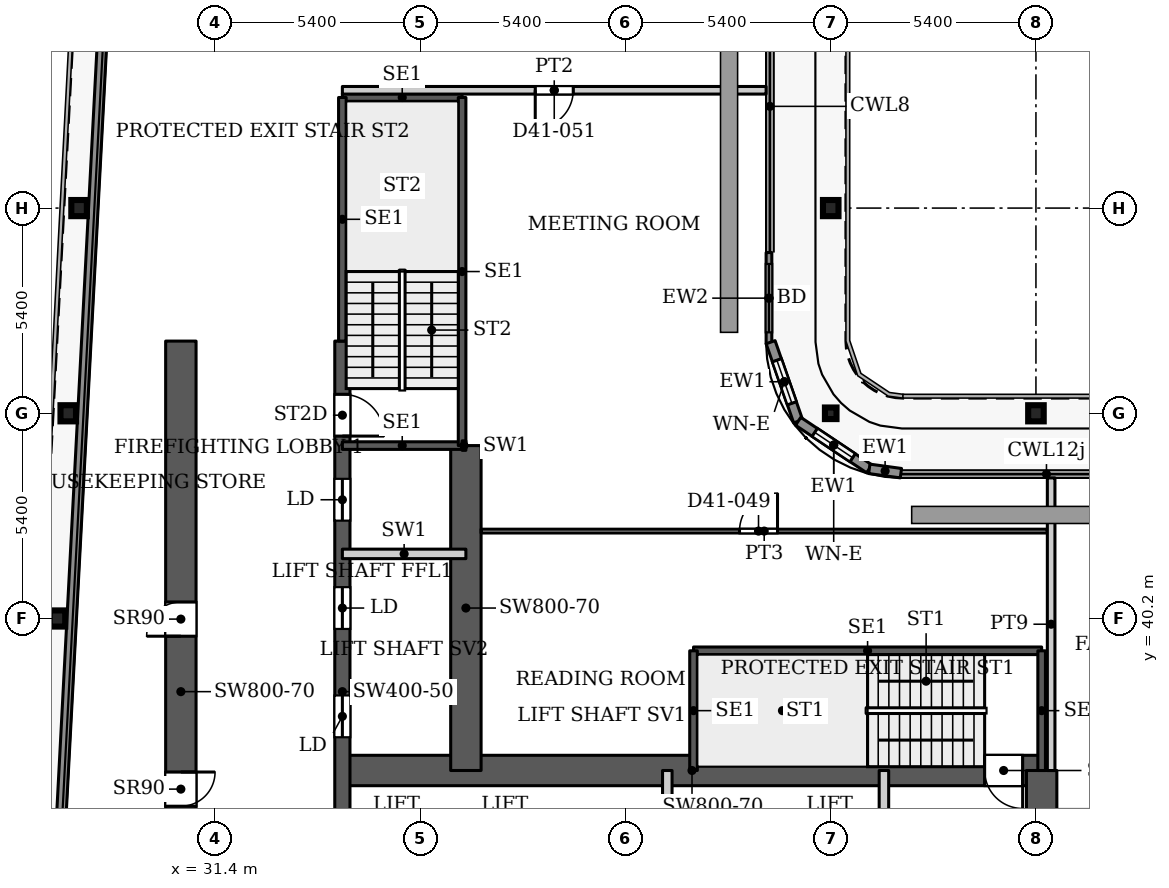
"""IFC4 building model, lengths in metres.
Left out: names, types, materials, properties, quantities, classifications, styles, units other than length and angle.
Written with IfcOpenShell. Run it as: python <this file> out.ifc"""

import sys

from ifc_helpers import new_model, si_unit, direction, frame, frame_2d, origin, origin_2d, place, context, subcontext, project, spatial, rectangle, hollow_rectangle, i_section, extrude, source, transform, mapped, element, fill, save


model = new_model("IFC4")
c1 = context("Model", 3, precision=1e-05, world=origin(), true_north=direction((0.0, 1.0)))
c2 = subcontext(c1, "Body", "Model", "MODEL_VIEW")
j1 = project(units=[si_unit("LENGTHUNIT", "METRE"), si_unit("PLANEANGLEUNIT", "RADIAN")], contexts=[c1])
p1 = place(None, origin())
s1 = spatial("IfcSite", under=j1, at=p1, CompositionType="ELEMENT")
p2 = place(p1, origin())
s2 = spatial("IfcBuilding", under=s1, at=p2, CompositionType="ELEMENT")
p3 = place(p2, frame((0.0, 0.0, 179.9)))
s3 = spatial("IfcBuildingStorey", under=s2, at=p3, CompositionType="ELEMENT", Elevation=179.9)
for number, where, z_axis, x_axis in (
    (1, (27.253, 40.2, 0.0), (0.0, 0.0, 1.0), (1.0, 0.0, 0.0)),
    (2, (27.537, 45.6, 0.0), (0.0, 0.0, 1.0), (1.0, 0.0, 0.0)),
    (3, (53.0, 45.6, 0.0), (0.0, 0.0, 1.0), (1.0, 0.0, 0.0)),
    (4, (27.822, 51.0, 0.0), (0.0, 0.0, 1.0), (1.0, 0.0, 0.0)),
    (5, (47.6, 51.0, 0.0), (0.0, 0.0, 1.0), (1.0, 0.0, 0.0)),
):
    element("IfcColumn", number, at=place(p3, frame(where, z_axis=z_axis, x_axis=x_axis)), inside=s3, PredefinedType="COLUMN", context=c2, shape_type="SweptSolid", body=[
        extrude(i_section(OverallWidth=0.409, OverallDepth=0.425, WebThickness=0.033, FlangeThickness=0.052, FilletRadius=0.013, at=origin_2d()), origin(), (0.0, 0.0, 1.0), 3.9),
    ])
p4 = place(p3, frame((47.6, 45.6, 0.0), z_axis=(0.0, 0.0, 1.0), x_axis=(1.0, 0.0, 0.0)))
e6 = element("IfcColumn", 6, at=p4, inside=s3, PredefinedType="COLUMN", context=c2, shape_type="SweptSolid", body=[
    extrude(hollow_rectangle(XDim=0.305, YDim=0.305, WallThickness=0.016, InnerFilletRadius=0.016, OuterFilletRadius=0.032, at=origin_2d()), origin(), (0.0, 0.0, 1.0), 3.9),
])
p5 = place(p3, frame((34.75, 36.2, 0.0), z_axis=(0.0, 0.0, 1.0), x_axis=(1.0, 0.0, 0.0)))
e7 = element("IfcWall", 7, at=p5, inside=s3, PredefinedType="SHEAR", context=c2, shape_type="SweptSolid", body=[
    extrude(rectangle(XDim=18.4, YDim=0.8, at=frame_2d((9.2, 0.0))), origin(), (0.0, 0.0, 1.0), 3.9),
])
p6 = place(p5, frame((16.9, 0.0, 0.0)))
e8 = element("IfcOpeningElement", 8, at=p6, cuts=e7, PredefinedType="OPENING", context=c2, shape_type="SweptSolid", body=[
    extrude(rectangle(XDim=1.0, YDim=2.2, at=frame_2d((0.5, 1.1))), frame((0.0, 0.41, 0.0), z_axis=(0.0, -1.0, 0.0), x_axis=(1.0, 0.0, 0.0)), (0.0, 0.0, 1.0), 0.82),
])
p7 = place(p3, frame((34.75, 29.05, 0.0), z_axis=(0.0, 0.0, 1.0), x_axis=(0.0, 1.0, 0.0)))
e9 = element("IfcWall", 9, at=p7, inside=s3, PredefinedType="SHEAR", context=c2, shape_type="SweptSolid", body=[
    extrude(rectangle(XDim=18.45, YDim=0.4, at=frame_2d((9.225, 0.0))), origin(), (0.0, 0.0, 1.0), 3.9),
])
p8 = place(p7, frame((8.025, 0.0, 0.0)))
e10 = element("IfcOpeningElement", 10, at=p8, cuts=e9, PredefinedType="OPENING", context=c2, shape_type="SweptSolid", body=[
    extrude(rectangle(XDim=1.1, YDim=2.2, at=frame_2d((0.55, 1.1))), frame((0.0, 0.21, 0.0), z_axis=(0.0, -1.0, 0.0), x_axis=(1.0, 0.0, 0.0)), (0.0, 0.0, 1.0), 0.42),
])
p9 = place(p7, frame((10.875, 0.0, 0.0)))
e11 = element("IfcOpeningElement", 11, at=p9, cuts=e9, PredefinedType="OPENING", context=c2, shape_type="SweptSolid", body=[
    extrude(rectangle(XDim=1.1, YDim=2.2, at=frame_2d((0.55, 1.1))), frame((0.0, 0.21, 0.0), z_axis=(0.0, -1.0, 0.0), x_axis=(1.0, 0.0, 0.0)), (0.0, 0.0, 1.0), 0.42),
])
p10 = place(p7, frame((13.725, 0.0, 0.0)))
e12 = element("IfcOpeningElement", 12, at=p10, cuts=e9, PredefinedType="OPENING", context=c2, shape_type="SweptSolid", body=[
    extrude(rectangle(XDim=1.1, YDim=2.2, at=frame_2d((0.55, 1.1))), frame((0.0, 0.21, 0.0), z_axis=(0.0, -1.0, 0.0), x_axis=(1.0, 0.0, 0.0)), (0.0, 0.0, 1.0), 0.42),
])
p11 = place(p7, frame((15.95, 0.0, 0.0)))
e13 = element("IfcOpeningElement", 13, at=p11, cuts=e9, PredefinedType="OPENING", context=c2, shape_type="SweptSolid", body=[
    extrude(rectangle(XDim=1.1, YDim=2.2, at=frame_2d((0.55, 1.1))), frame((0.0, 0.21, 0.0), z_axis=(0.0, -1.0, 0.0), x_axis=(1.0, 0.0, 0.0)), (0.0, 0.0, 1.0), 0.42),
])
p12 = place(p3, frame((38.0, 36.2, 0.0), z_axis=(0.0, 0.0, 1.0), x_axis=(0.0, 1.0, 0.0)))
e14 = element("IfcWall", 14, at=p12, inside=s3, PredefinedType="SHEAR", context=c2, shape_type="SweptSolid", body=[
    extrude(rectangle(XDim=8.55, YDim=0.8, at=frame_2d((4.275, 0.0))), origin(), (0.0, 0.0, 1.0), 3.9),
])
p13 = place(p3, frame((30.5, 29.05, 0.0), z_axis=(0.0, 0.0, 1.0), x_axis=(0.0, 1.0, 0.0)))
e15 = element("IfcWall", 15, at=p13, inside=s3, PredefinedType="SHEAR", context=c2, shape_type="SweptSolid", body=[
    extrude(rectangle(XDim=18.45, YDim=0.8, at=frame_2d((9.225, 0.0))), origin(), (0.0, 0.0, 1.0), 3.9),
])
p14 = place(p13, frame((6.21, 0.0, 0.0)))
e16 = element("IfcOpeningElement", 16, at=p14, cuts=e15, PredefinedType="OPENING", context=c2, shape_type="SweptSolid", body=[
    extrude(rectangle(XDim=0.9, YDim=2.2, at=frame_2d((0.45, 1.1))), frame((0.0, 0.41, 0.0), z_axis=(0.0, -1.0, 0.0), x_axis=(1.0, 0.0, 0.0)), (0.0, 0.0, 1.0), 0.82),
])
p15 = place(p13, frame((10.684, 0.0, 0.0)))
e17 = element("IfcOpeningElement", 17, at=p15, cuts=e15, PredefinedType="OPENING", context=c2, shape_type="SweptSolid", body=[
    extrude(rectangle(XDim=0.9, YDim=2.2, at=frame_2d((0.45, 1.1))), frame((0.0, 0.41, 0.0), z_axis=(0.0, -1.0, 0.0), x_axis=(1.0, 0.0, 0.0)), (0.0, 0.0, 1.0), 0.82),
])
p16 = place(p3, frame((53.15, 25.8, 0.0), z_axis=(0.0, 0.0, 1.0), x_axis=(0.0, 1.0, 0.0)))
e18 = element("IfcWall", 18, at=p16, inside=s3, PredefinedType="SHEAR", context=c2, shape_type="SweptSolid", body=[
    extrude(rectangle(XDim=10.4, YDim=0.8, at=frame_2d((5.2, 0.0))), origin(), (0.0, 0.0, 1.0), 3.9),
])
p17 = place(p3, frame((27.195, 31.969, 0.0), z_axis=(0.0, 0.0, 1.0), x_axis=(0.052554995867, 0.998618031286, 0.0)))
e19 = element("IfcWall", 19, at=p17, inside=s3, PredefinedType="SOLIDWALL", context=c2, shape_type="SweptSolid", body=[
    extrude(rectangle(XDim=66.787, YDim=0.25, at=frame_2d((33.394, 0.0))), origin(), (0.0, 0.0, 1.0), 3.75),
])
p18 = place(p3, frame((45.975, 49.83, 0.0), z_axis=(0.0, 0.0, 1.0), x_axis=(0.0, -1.0, 0.0)))
e20 = element("IfcWall", 20, at=p18, inside=s3, PredefinedType="SOLIDWALL", context=c2, shape_type="SweptSolid", body=[
    extrude(rectangle(XDim=2.4, YDim=0.15, at=frame_2d((1.2, 0.0))), origin(), (0.0, 0.0, 1.0), 3.75),
])
p19 = place(p18, frame((0.3, 0.0, 0.0)))
e21 = element("IfcOpeningElement", 21, at=p19, cuts=e20, PredefinedType="OPENING", context=c2, shape_type="SweptSolid", body=[
    extrude(rectangle(XDim=1.8, YDim=2.4, at=frame_2d((0.9, 1.2))), frame((0.0, 0.085, 0.0), z_axis=(0.0, -1.0, 0.0), x_axis=(1.0, 0.0, 0.0)), (0.0, 0.0, 1.0), 0.17),
])
p20 = place(p3, frame((46.018, 47.471, 0.0), z_axis=(0.0, 0.0, 1.0), x_axis=(0.328791208903, -0.944402637093, 0.0)))
e22 = element("IfcWall", 22, at=p20, inside=s3, PredefinedType="SOLIDWALL", context=c2, shape_type="SweptSolid", body=[
    extrude(rectangle(XDim=2.205, YDim=0.25, at=frame_2d((1.102, 0.0))), origin(), (0.0, 0.0, 1.0), 3.75),
])
p21 = place(p20, frame((0.503, 0.0, 0.6)))
e23 = element("IfcOpeningElement", 23, at=p21, cuts=e22, PredefinedType="OPENING", context=c2, shape_type="SweptSolid", body=[
    extrude(rectangle(XDim=1.2, YDim=2.1, at=frame_2d((0.6, 1.05))), frame((0.0, 0.135, 0.0), z_axis=(0.0, -1.0, 0.0), x_axis=(1.0, 0.0, 0.0)), (0.0, 0.0, 1.0), 0.27),
])
p22 = place(p3, frame((46.743, 45.389, 0.0), z_axis=(0.0, 0.0, 1.0), x_axis=(0.831449265529, -0.555600682912, 0.0)))
e24 = element("IfcWall", 24, at=p22, inside=s3, PredefinedType="SOLIDWALL", context=c2, shape_type="SweptSolid", body=[
    extrude(rectangle(XDim=2.251, YDim=0.25, at=frame_2d((1.126, 0.0))), origin(), (0.0, 0.0, 1.0), 3.75),
])
p23 = place(p22, frame((0.525, 0.0, 0.6)))
e25 = element("IfcOpeningElement", 25, at=p23, cuts=e24, PredefinedType="OPENING", context=c2, shape_type="SweptSolid", body=[
    extrude(rectangle(XDim=1.2, YDim=2.1, at=frame_2d((0.6, 1.05))), frame((0.0, 0.135, 0.0), z_axis=(0.0, -1.0, 0.0), x_axis=(1.0, 0.0, 0.0)), (0.0, 0.0, 1.0), 0.27),
])
p24 = place(p3, frame((48.615, 44.138, 0.0), z_axis=(0.0, 0.0, 1.0), x_axis=(0.990741504246, -0.135761819977, 0.0)))
e26 = element("IfcWall", 26, at=p24, inside=s3, PredefinedType="SOLIDWALL", context=c2, shape_type="SweptSolid", body=[
    extrude(rectangle(XDim=0.84, YDim=0.25, at=frame_2d((0.42, 0.0))), origin(), (0.0, 0.0, 1.0), 3.75),
])
p25 = place(p3, frame((43.99, 39.35, 0.0), z_axis=(0.0, 0.0, 1.0), x_axis=(1.0, 0.0, 0.0)))
e27 = element("IfcWall", 27, at=p25, inside=s3, PredefinedType="SHEAR", context=c2, shape_type="SweptSolid", body=[
    extrude(rectangle(XDim=9.16, YDim=0.2, at=frame_2d((4.58, 0.0))), origin(), (0.0, 0.0, 1.0), 3.9),
])
for number, where, z_axis, x_axis in (
    (28, (43.99, 36.2, 0.0), (0.0, 0.0, 1.0), (0.0, 1.0, 0.0)),
    (29, (53.15, 36.2, 0.0), (0.0, 0.0, 1.0), (0.0, 1.0, 0.0)),
):
    element("IfcWall", number, at=place(p3, frame(where, z_axis=z_axis, x_axis=x_axis)), inside=s3, PredefinedType="SHEAR", context=c2, shape_type="SweptSolid", body=[
        extrude(rectangle(XDim=3.15, YDim=0.2, at=frame_2d((1.575, 0.0))), origin(), (0.0, 0.0, 1.0), 3.9),
    ])
for number, where, z_axis, x_axis in (
    (30, (34.75, 44.75, 0.0), (0.0, 0.0, 1.0), (1.0, 0.0, 0.0)),
    (31, (34.75, 53.91, 0.0), (0.0, 0.0, 1.0), (1.0, 0.0, 0.0)),
):
    element("IfcWall", number, at=place(p3, frame(where, z_axis=z_axis, x_axis=x_axis)), inside=s3, PredefinedType="SHEAR", context=c2, shape_type="SweptSolid", body=[
        extrude(rectangle(XDim=3.15, YDim=0.2, at=frame_2d((1.575, 0.0))), origin(), (0.0, 0.0, 1.0), 3.9),
    ])
p26 = place(p3, frame((34.75, 47.5, 0.0), z_axis=(0.0, 0.0, 1.0), x_axis=(0.0, 1.0, 0.0)))
e32 = element("IfcWall", 32, at=p26, inside=s3, PredefinedType="SHEAR", context=c2, shape_type="SweptSolid", body=[
    extrude(rectangle(XDim=6.41, YDim=0.2, at=frame_2d((3.205, 0.0))), origin(), (0.0, 0.0, 1.0), 3.9),
])
p27 = place(p3, frame((37.9, 44.75, 0.0), z_axis=(0.0, 0.0, 1.0), x_axis=(0.0, 1.0, 0.0)))
e33 = element("IfcWall", 33, at=p27, inside=s3, PredefinedType="SHEAR", context=c2, shape_type="SweptSolid", body=[
    extrude(rectangle(XDim=9.16, YDim=0.2, at=frame_2d((4.58, 0.0))), origin(), (0.0, 0.0, 1.0), 3.9),
])
for number, where, z_axis, x_axis in (
    (34, (43.3, 32.95, 0.0), (0.0, 0.0, 1.0), (0.0, 1.0, 0.0)),
    (35, (49.0, 32.95, 0.0), (0.0, 0.0, 1.0), (0.0, 1.0, 0.0)),
    (36, (34.75, 41.9, 0.0), (0.0, 0.0, 1.0), (1.0, 0.0, 0.0)),
):
    element("IfcWall", number, at=place(p3, frame(where, z_axis=z_axis, x_axis=x_axis)), inside=s3, PredefinedType="PARTITIONING", context=c2, shape_type="SweptSolid", body=[
        extrude(rectangle(XDim=3.25, YDim=0.25, at=frame_2d((1.625, 0.0))), origin(), (0.0, 0.0, 1.0), 3.9),
    ])
p28 = place(p3, frame((37.9, 44.75, 0.0), z_axis=(0.0, 0.0, 1.0), x_axis=(1.0, 0.0, 0.0)))
e37 = element("IfcWall", 37, at=p28, inside=s3, PredefinedType="PARTITIONING", context=c2, shape_type="SweptSolid", body=[
    extrude(rectangle(XDim=0.1, YDim=0.25, at=frame_2d((0.05, 0.0))), origin(), (0.0, 0.0, 1.0), 3.9),
])
p29 = place(p3, frame((34.75, 54.1, 0.0), z_axis=(0.0, 0.0, 1.0), x_axis=(1.0, 0.0, 0.0)))
e38 = element("IfcWall", 38, at=p29, inside=s3, PredefinedType="PARTITIONING", context=c2, shape_type="SweptSolid", body=[
    extrude(rectangle(XDim=11.15, YDim=0.2, at=frame_2d((5.575, 0.0))), origin(), (0.0, 0.0, 1.0), 3.6),
])
p30 = place(p29, frame((5.075, 0.0, 0.0)))
e39 = element("IfcOpeningElement", 39, at=p30, cuts=e38, PredefinedType="OPENING", context=c2, shape_type="SweptSolid", body=[
    extrude(rectangle(XDim=1.0, YDim=2.1, at=frame_2d((0.5, 1.05))), frame((0.0, 0.11, 0.0), z_axis=(0.0, -1.0, 0.0), x_axis=(1.0, 0.0, 0.0)), (0.0, 0.0, 1.0), 0.22),
])
p31 = place(p3, frame((38.399, 42.5, 0.0), z_axis=(0.0, 0.0, 1.0), x_axis=(1.0, 0.0, 0.0)))
e40 = element("IfcWall", 40, at=p31, inside=s3, PredefinedType="PARTITIONING", context=c2, shape_type="SweptSolid", body=[
    extrude(rectangle(XDim=14.901, YDim=0.1, at=frame_2d((7.451, 0.0))), origin(), (0.0, 0.0, 1.0), 3.6),
])
p32 = place(p31, frame((6.801, 0.0, 0.0)))
e41 = element("IfcOpeningElement", 41, at=p32, cuts=e40, PredefinedType="OPENING", context=c2, shape_type="SweptSolid", body=[
    extrude(rectangle(XDim=1.0, YDim=2.1, at=frame_2d((0.5, 1.05))), frame((0.0, 0.06, 0.0), z_axis=(0.0, -1.0, 0.0), x_axis=(1.0, 0.0, 0.0)), (0.0, 0.0, 1.0), 0.12),
])
p33 = place(p3, frame((53.4, 36.199, 0.0), z_axis=(0.0, 0.0, 1.0), x_axis=(0.0, 1.0, 0.0)))
e42 = element("IfcWall", 42, at=p33, inside=s3, PredefinedType="PARTITIONING", context=c2, shape_type="SweptSolid", body=[
    extrude(rectangle(XDim=7.701, YDim=0.2, at=frame_2d((3.851, 0.0))), origin(), (0.0, 0.0, 1.0), 3.6),
])
m1 = source(origin(), c2, "Body", "SweptSolid", [
    extrude(rectangle(XDim=1.8, YDim=2.4, at=frame_2d((0.9, 1.2))), frame((0.0, 0.025, 0.0), z_axis=(0.0, -1.0, 0.0), x_axis=(1.0, 0.0, 0.0)), (0.0, 0.0, 1.0), 0.05),
])
p34 = place(p19, origin())
e43 = element("IfcDoor", 43, at=p34, inside=s3, OperationType="SLIDING_TO_LEFT", PredefinedType="DOOR", context=c2, shape_type="MappedRepresentation", body=[
    mapped(m1, transform((0.0, 0.0, 0.0), x_axis=(1.0, 0.0, 0.0), y_axis=(0.0, 1.0, 0.0), z_axis=(0.0, 0.0, 1.0), scale=1.0)),
])
fill(e21, e43)
m2 = source(origin(), c2, "Body", "SweptSolid", [
    extrude(rectangle(XDim=1.2, YDim=2.1, at=frame_2d((0.6, 1.05))), frame((0.0, 0.03, 0.0), z_axis=(0.0, -1.0, 0.0), x_axis=(1.0, 0.0, 0.0)), (0.0, 0.0, 1.0), 0.06),
])
p35 = place(p21, origin())
e44 = element("IfcWindow", 44, at=p35, inside=s3, PartitioningType="SINGLE_PANEL", PredefinedType="WINDOW", context=c2, shape_type="MappedRepresentation", body=[
    mapped(m2, transform((0.0, 0.0, 0.0), x_axis=(1.0, 0.0, 0.0), y_axis=(0.0, 1.0, 0.0), z_axis=(0.0, 0.0, 1.0), scale=1.0)),
])
fill(e23, e44)
p36 = place(p23, origin())
e45 = element("IfcWindow", 45, at=p36, inside=s3, PartitioningType="SINGLE_PANEL", PredefinedType="WINDOW", context=c2, shape_type="MappedRepresentation", body=[
    mapped(m2, transform((0.0, 0.0, 0.0), x_axis=(1.0, 0.0, 0.0), y_axis=(0.0, 1.0, 0.0), z_axis=(0.0, 0.0, 1.0), scale=1.0)),
])
fill(e25, e45)
m3 = source(origin(), c2, "Body", "SweptSolid", [
    extrude(rectangle(XDim=1.1, YDim=2.2, at=frame_2d((0.55, 1.1))), frame((0.0, 0.025, 0.0), z_axis=(0.0, -1.0, 0.0), x_axis=(1.0, 0.0, 0.0)), (0.0, 0.0, 1.0), 0.05),
])
p37 = place(p8, origin())
e46 = element("IfcDoor", 46, at=p37, inside=s3, OperationType="SLIDING_TO_LEFT", PredefinedType="DOOR", context=c2, shape_type="MappedRepresentation", body=[
    mapped(m3, transform((0.0, 0.0, 0.0), x_axis=(1.0, 0.0, 0.0), y_axis=(0.0, 1.0, 0.0), z_axis=(0.0, 0.0, 1.0), scale=1.0)),
])
fill(e10, e46)
p38 = place(p9, origin())
e47 = element("IfcDoor", 47, at=p38, inside=s3, OperationType="SLIDING_TO_LEFT", PredefinedType="DOOR", context=c2, shape_type="MappedRepresentation", body=[
    mapped(m3, transform((0.0, 0.0, 0.0), x_axis=(1.0, 0.0, 0.0), y_axis=(0.0, 1.0, 0.0), z_axis=(0.0, 0.0, 1.0), scale=1.0)),
])
fill(e11, e47)
p39 = place(p10, origin())
e48 = element("IfcDoor", 48, at=p39, inside=s3, OperationType="SLIDING_TO_LEFT", PredefinedType="DOOR", context=c2, shape_type="MappedRepresentation", body=[
    mapped(m3, transform((0.0, 0.0, 0.0), x_axis=(1.0, 0.0, 0.0), y_axis=(0.0, 1.0, 0.0), z_axis=(0.0, 0.0, 1.0), scale=1.0)),
])
fill(e12, e48)
m4 = source(origin(), c2, "Body", "SweptSolid", [
    extrude(rectangle(XDim=0.9, YDim=2.2, at=frame_2d((0.45, 1.1))), frame((0.0, 0.025, 0.0), z_axis=(0.0, -1.0, 0.0), x_axis=(1.0, 0.0, 0.0)), (0.0, 0.0, 1.0), 0.05),
])
p40 = place(p14, origin())
e49 = element("IfcDoor", 49, at=p40, inside=s3, OperationType="SINGLE_SWING_RIGHT", PredefinedType="DOOR", context=c2, shape_type="MappedRepresentation", body=[
    mapped(m4, transform((0.0, 0.0, 0.0), x_axis=(1.0, 0.0, 0.0), y_axis=(0.0, 1.0, 0.0), z_axis=(0.0, 0.0, 1.0), scale=1.0)),
])
fill(e16, e49)
p41 = place(p15, origin())
e50 = element("IfcDoor", 50, at=p41, inside=s3, OperationType="SINGLE_SWING_LEFT", PredefinedType="DOOR", context=c2, shape_type="MappedRepresentation", body=[
    mapped(m4, transform((0.0, 0.0, 0.0), x_axis=(1.0, 0.0, 0.0), y_axis=(0.0, 1.0, 0.0), z_axis=(0.0, 0.0, 1.0), scale=1.0)),
])
fill(e17, e50)
m5 = source(origin(), c2, "Body", "SweptSolid", [
    extrude(rectangle(XDim=1.0, YDim=2.2, at=frame_2d((0.5, 1.1))), frame((0.0, 0.025, 0.0), z_axis=(0.0, -1.0, 0.0), x_axis=(1.0, 0.0, 0.0)), (0.0, 0.0, 1.0), 0.05),
])
p42 = place(p6, origin())
e51 = element("IfcDoor", 51, at=p42, inside=s3, OperationType="SINGLE_SWING_RIGHT", PredefinedType="DOOR", context=c2, shape_type="MappedRepresentation", body=[
    mapped(m5, transform((0.0, 0.0, 0.0), x_axis=(1.0, 0.0, 0.0), y_axis=(0.0, 1.0, 0.0), z_axis=(0.0, 0.0, 1.0), scale=1.0)),
])
fill(e8, e51)
m6 = source(origin(), c2, "Body", "SweptSolid", [
    extrude(rectangle(XDim=1.1, YDim=2.2, at=frame_2d((0.55, 1.1))), frame((0.0, 0.025, 0.0), z_axis=(0.0, -1.0, 0.0), x_axis=(1.0, 0.0, 0.0)), (0.0, 0.0, 1.0), 0.05),
])
p43 = place(p11, origin())
e52 = element("IfcDoor", 52, at=p43, inside=s3, OperationType="SINGLE_SWING_RIGHT", PredefinedType="DOOR", context=c2, shape_type="MappedRepresentation", body=[
    mapped(m6, transform((0.0, 0.0, 0.0), x_axis=(1.0, 0.0, 0.0), y_axis=(0.0, 1.0, 0.0), z_axis=(0.0, 0.0, 1.0), scale=1.0)),
])
fill(e13, e52)
m7 = source(origin(), c2, "Body", "SweptSolid", [
    extrude(rectangle(XDim=1.0, YDim=2.1, at=frame_2d((0.5, 1.05))), frame((0.0, 0.025, 0.0), z_axis=(0.0, -1.0, 0.0), x_axis=(1.0, 0.0, 0.0)), (0.0, 0.0, 1.0), 0.05),
])
p44 = place(p32, origin())
e53 = element("IfcDoor", 53, at=p44, inside=s3, OperationType="SINGLE_SWING_LEFT", PredefinedType="DOOR", context=c2, shape_type="MappedRepresentation", body=[
    mapped(m7, transform((0.0, 0.0, 0.0), x_axis=(1.0, 0.0, 0.0), y_axis=(0.0, 1.0, 0.0), z_axis=(0.0, 0.0, 1.0), scale=1.0)),
])
fill(e41, e53)
m8 = source(origin(), c2, "Body", "SweptSolid", [
    extrude(rectangle(XDim=1.0, YDim=2.1, at=frame_2d((0.5, 1.05))), frame((0.0, 0.025, 0.0), z_axis=(0.0, -1.0, 0.0), x_axis=(1.0, 0.0, 0.0)), (0.0, 0.0, 1.0), 0.05),
])
p45 = place(p30, origin())
e54 = element("IfcDoor", 54, at=p45, inside=s3, OperationType="SINGLE_SWING_RIGHT", PredefinedType="DOOR", context=c2, shape_type="MappedRepresentation", body=[
    mapped(m8, transform((0.0, 0.0, 0.0), x_axis=(1.0, 0.0, 0.0), y_axis=(0.0, 1.0, 0.0), z_axis=(0.0, 0.0, 1.0), scale=1.0)),
])
fill(e39, e54)
save(model, sys.argv[1])
